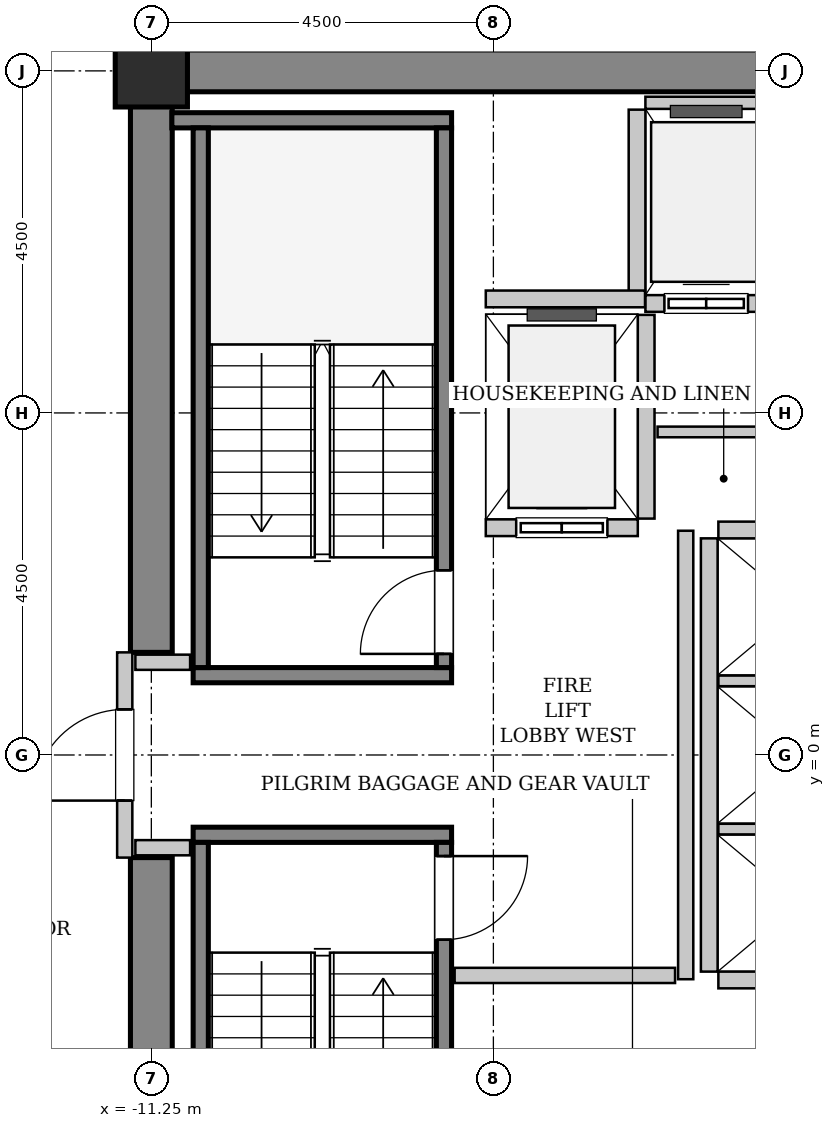
"""IFC4 building model, lengths in metres.
Left out: names, types, materials, properties, quantities, classifications, styles, units other than length and angle.
Written with IfcOpenShell. Run it as: python <this file> out.ifc"""

import sys

from ifc_helpers import new_model, si_unit, direction, frame, frame_2d, origin, origin_2d, place, context, subcontext, project, spatial, rectangle, hollow_rectangle, extrude, source, transform, mapped, element, fill, save


model = new_model("IFC4")
c1 = context("Model", 3, precision=1e-05, world=origin(), true_north=direction((0.0, 1.0)))
c2 = subcontext(c1, "Body", "Model", "MODEL_VIEW")
j1 = project(units=[si_unit("LENGTHUNIT", "METRE"), si_unit("PLANEANGLEUNIT", "RADIAN")], contexts=[c1])
p1 = place(None, origin())
s1 = spatial("IfcSite", under=j1, at=p1, CompositionType="ELEMENT")
p2 = place(p1, origin())
s2 = spatial("IfcBuilding", under=s1, at=p2, CompositionType="ELEMENT")
p3 = place(p2, frame((0.0, 0.0, 113.6)))
s3 = spatial("IfcBuildingStorey", under=s2, at=p3, CompositionType="ELEMENT", Elevation=113.6)
m1 = source(origin(), c2, "Body", "SweptSolid", [
    extrude(rectangle(XDim=9.975, YDim=0.55, at=frame_2d((4.987, 0.0))), origin(), (0.0, 0.0, 1.0), 3.8),
])
p4 = place(p3, frame((-11.525, 9.0, 0.0), z_axis=(0.0, 0.0, 1.0), x_axis=(1.0, 0.0, 0.0)))
e1 = element("IfcWall", 1, at=p4, inside=s3, PredefinedType="SHEAR", context=c2, shape_type="MappedRepresentation", body=[
    mapped(m1, transform((0.0, 0.0, 0.0), x_axis=(1.0, 0.0, 0.0), y_axis=(0.0, 1.0, 0.0), z_axis=(0.0, 0.0, 1.0), scale=1.0)),
])
m2 = source(origin(), c2, "Body", "SweptSolid", [
    extrude(rectangle(XDim=7.375, YDim=0.55, at=frame_2d((3.688, 0.0))), origin(), (0.0, 0.0, 1.0), 3.8),
])
for number, where, z_axis, x_axis in (
    (2, (-11.25, -8.725, 0.0), (0.0, 0.0, 1.0), (0.0, 1.0, 0.0)),
    (3, (-11.25, 1.35, 0.0), (0.0, 0.0, 1.0), (0.0, 1.0, 0.0)),
):
    element("IfcWall", number, at=place(p3, frame(where, z_axis=z_axis, x_axis=x_axis)), inside=s3, PredefinedType="SHEAR", context=c2, shape_type="MappedRepresentation", body=[
        mapped(m2, transform((0.0, 0.0, 0.0), x_axis=(1.0, 0.0, 0.0), y_axis=(0.0, 1.0, 0.0), z_axis=(0.0, 0.0, 1.0), scale=1.0)),
    ])
m3 = source(origin(), c2, "Body", "SweptSolid", [
    extrude(hollow_rectangle(XDim=0.95, YDim=0.95, WallThickness=0.045, InnerFilletRadius=0.045, OuterFilletRadius=0.09, at=origin_2d()), origin(), (0.0, 0.0, 1.0), 3.8),
])
p5 = place(p3, frame((-11.25, 9.0, 0.0), z_axis=(0.0, 0.0, 1.0), x_axis=(1.0, 0.0, 0.0)))
e4 = element("IfcColumn", 4, at=p5, inside=s3, PredefinedType="COLUMN", context=c2, shape_type="MappedRepresentation", body=[
    mapped(m3, transform((0.0, 0.0, 0.0), x_axis=(1.0, 0.0, 0.0), y_axis=(0.0, 1.0, 0.0), z_axis=(0.0, 0.0, 1.0), scale=1.0)),
])
m4 = source(origin(), c2, "Body", "SweptSolid", [
    extrude(rectangle(XDim=3.4, YDim=0.2, at=frame_2d((1.7, 0.0))), origin(), (0.0, 0.0, 1.0), 3.8),
])
p6 = place(p3, frame((-7.3, 1.05, 0.0), z_axis=(0.0, 0.0, 1.0), x_axis=(-1.0, 0.0, 0.0)))
e5 = element("IfcWall", 5, at=p6, inside=s3, PredefinedType="SOLIDWALL", context=c2, shape_type="MappedRepresentation", body=[
    mapped(m4, transform((0.0, 0.0, 0.0), x_axis=(1.0, 0.0, 0.0), y_axis=(0.0, 1.0, 0.0), z_axis=(0.0, 0.0, 1.0), scale=1.0)),
])
m5 = source(origin(), c2, "Body", "SweptSolid", [
    extrude(rectangle(XDim=3.68, YDim=0.2, at=frame_2d((1.84, 0.0))), origin(), (0.0, 0.0, 1.0), 3.8),
])
p7 = place(p3, frame((-7.3, 8.35, 0.0), z_axis=(0.0, 0.0, 1.0), x_axis=(-1.0, 0.0, 0.0)))
e6 = element("IfcWall", 6, at=p7, inside=s3, PredefinedType="SOLIDWALL", context=c2, shape_type="MappedRepresentation", body=[
    mapped(m5, transform((0.0, 0.0, 0.0), x_axis=(1.0, 0.0, 0.0), y_axis=(0.0, 1.0, 0.0), z_axis=(0.0, 0.0, 1.0), scale=1.0)),
])
m6 = source(origin(), c2, "Body", "SweptSolid", [
    extrude(rectangle(XDim=7.1, YDim=0.2, at=frame_2d((3.55, 0.0))), origin(), (0.0, 0.0, 1.0), 3.8),
])
p8 = place(p3, frame((-7.4, 1.15, 0.0), z_axis=(0.0, 0.0, 1.0), x_axis=(0.0, 1.0, 0.0)))
e7 = element("IfcWall", 7, at=p8, inside=s3, PredefinedType="SOLIDWALL", context=c2, shape_type="MappedRepresentation", body=[
    mapped(m6, transform((0.0, 0.0, 0.0), x_axis=(1.0, 0.0, 0.0), y_axis=(0.0, 1.0, 0.0), z_axis=(0.0, 0.0, 1.0), scale=1.0)),
])
p9 = place(p8, frame((0.18, 0.0, 0.0)))
e8 = element("IfcOpeningElement", 8, at=p9, cuts=e7, PredefinedType="OPENING", context=c2, shape_type="SweptSolid", body=[
    extrude(rectangle(XDim=1.1, YDim=2.15, at=frame_2d((0.55, 1.075))), frame((0.0, 0.11, 0.0), z_axis=(0.0, -1.0, 0.0), x_axis=(1.0, 0.0, 0.0)), (0.0, 0.0, 1.0), 0.22),
])
p10 = place(p3, frame((-10.6, 1.15, 0.0), z_axis=(0.0, 0.0, 1.0), x_axis=(0.0, 1.0, 0.0)))
e9 = element("IfcWall", 9, at=p10, inside=s3, PredefinedType="SOLIDWALL", context=c2, shape_type="MappedRepresentation", body=[
    mapped(m6, transform((0.0, 0.0, 0.0), x_axis=(1.0, 0.0, 0.0), y_axis=(0.0, 1.0, 0.0), z_axis=(0.0, 0.0, 1.0), scale=1.0)),
])
p11 = place(p3, frame((-10.7, -1.05, 0.0), z_axis=(0.0, 0.0, 1.0), x_axis=(1.0, 0.0, 0.0)))
e10 = element("IfcWall", 10, at=p11, inside=s3, PredefinedType="SOLIDWALL", context=c2, shape_type="MappedRepresentation", body=[
    mapped(m4, transform((0.0, 0.0, 0.0), x_axis=(1.0, 0.0, 0.0), y_axis=(0.0, 1.0, 0.0), z_axis=(0.0, 0.0, 1.0), scale=1.0)),
])
p12 = place(p3, frame((-10.6, -1.15, 0.0), z_axis=(0.0, 0.0, 1.0), x_axis=(0.0, -1.0, 0.0)))
e11 = element("IfcWall", 11, at=p12, inside=s3, PredefinedType="SOLIDWALL", context=c2, shape_type="MappedRepresentation", body=[
    mapped(m6, transform((0.0, 0.0, 0.0), x_axis=(1.0, 0.0, 0.0), y_axis=(0.0, 1.0, 0.0), z_axis=(0.0, 0.0, 1.0), scale=1.0)),
])
p13 = place(p3, frame((-7.4, -1.15, 0.0), z_axis=(0.0, 0.0, 1.0), x_axis=(0.0, -1.0, 0.0)))
e12 = element("IfcWall", 12, at=p13, inside=s3, PredefinedType="SOLIDWALL", context=c2, shape_type="MappedRepresentation", body=[
    mapped(m6, transform((0.0, 0.0, 0.0), x_axis=(1.0, 0.0, 0.0), y_axis=(0.0, 1.0, 0.0), z_axis=(0.0, 0.0, 1.0), scale=1.0)),
])
p14 = place(p13, frame((0.18, 0.0, 0.0)))
e13 = element("IfcOpeningElement", 13, at=p14, cuts=e12, PredefinedType="OPENING", context=c2, shape_type="SweptSolid", body=[
    extrude(rectangle(XDim=1.1, YDim=2.15, at=frame_2d((0.55, 1.075))), frame((0.0, 0.11, 0.0), z_axis=(0.0, -1.0, 0.0), x_axis=(1.0, 0.0, 0.0)), (0.0, 0.0, 1.0), 0.22),
])
m7 = source(origin(), c2, "Body", "SweptSolid", [
    extrude(rectangle(XDim=2.0, YDim=0.22, at=frame_2d((1.0, 0.0))), origin(), (0.0, 0.0, 1.0), 3.535),
])
p15 = place(p3, frame((-6.85, 2.99, 0.0), z_axis=(0.0, 0.0, 1.0), x_axis=(1.0, 0.0, 0.0)))
e14 = element("IfcWall", 14, at=p15, inside=s3, PredefinedType="SOLIDWALL", context=c2, shape_type="MappedRepresentation", body=[
    mapped(m7, transform((0.0, 0.0, 0.0), x_axis=(1.0, 0.0, 0.0), y_axis=(0.0, 1.0, 0.0), z_axis=(0.0, 0.0, 1.0), scale=1.0)),
])
p16 = place(p15, frame((0.4, 0.0, 0.0)))
e15 = element("IfcOpeningElement", 15, at=p16, cuts=e14, PredefinedType="OPENING", context=c2, shape_type="SweptSolid", body=[
    extrude(rectangle(XDim=1.2, YDim=2.2, at=frame_2d((0.6, 1.1))), frame((0.0, 0.12, 0.0), z_axis=(0.0, -1.0, 0.0), x_axis=(1.0, 0.0, 0.0)), (0.0, 0.0, 1.0), 0.24),
])
m8 = source(origin(), c2, "Body", "SweptSolid", [
    extrude(rectangle(XDim=2.68, YDim=0.22, at=frame_2d((1.34, 0.0))), origin(), (0.0, 0.0, 1.0), 3.535),
])
p17 = place(p3, frame((-4.74, 3.11, 0.0), z_axis=(0.0, 0.0, 1.0), x_axis=(0.0, 1.0, 0.0)))
e16 = element("IfcWall", 16, at=p17, inside=s3, PredefinedType="SOLIDWALL", context=c2, shape_type="MappedRepresentation", body=[
    mapped(m8, transform((0.0, 0.0, 0.0), x_axis=(1.0, 0.0, 0.0), y_axis=(0.0, 1.0, 0.0), z_axis=(0.0, 0.0, 1.0), scale=1.0)),
])
m9 = source(origin(), c2, "Body", "SweptSolid", [
    extrude(rectangle(XDim=3.2, YDim=0.22, at=frame_2d((1.6, 0.0))), origin(), (0.0, 0.0, 1.0), 3.535),
])
p18 = place(p3, frame((-4.75, 5.94, 0.0), z_axis=(0.0, 0.0, 1.0), x_axis=(1.0, 0.0, 0.0)))
e17 = element("IfcWall", 17, at=p18, inside=s3, PredefinedType="SOLIDWALL", context=c2, shape_type="MappedRepresentation", body=[
    mapped(m9, transform((0.0, 0.0, 0.0), x_axis=(1.0, 0.0, 0.0), y_axis=(0.0, 1.0, 0.0), z_axis=(0.0, 0.0, 1.0), scale=1.0)),
])
p19 = place(p18, frame((0.25, 0.0, 0.0)))
e18 = element("IfcOpeningElement", 18, at=p19, cuts=e17, PredefinedType="OPENING", context=c2, shape_type="SweptSolid", body=[
    extrude(rectangle(XDim=1.1, YDim=2.2, at=frame_2d((0.55, 1.1))), frame((0.0, 0.12, 0.0), z_axis=(0.0, -1.0, 0.0), x_axis=(1.0, 0.0, 0.0)), (0.0, 0.0, 1.0), 0.24),
])
p20 = place(p18, frame((1.875, 0.0, 0.0)))
e19 = element("IfcOpeningElement", 19, at=p20, cuts=e17, PredefinedType="OPENING", context=c2, shape_type="SweptSolid", body=[
    extrude(rectangle(XDim=1.1, YDim=2.2, at=frame_2d((0.55, 1.1))), frame((0.0, 0.12, 0.0), z_axis=(0.0, -1.0, 0.0), x_axis=(1.0, 0.0, 0.0)), (0.0, 0.0, 1.0), 0.24),
])
m10 = source(origin(), c2, "Body", "SweptSolid", [
    extrude(rectangle(XDim=3.2, YDim=0.16, at=frame_2d((1.6, 0.0))), origin(), (0.0, 0.0, 1.0), 2.425),
])
p21 = place(p3, frame((-1.55, 8.58, 0.0), z_axis=(0.0, 0.0, 1.0), x_axis=(-1.0, 0.0, 0.0)))
e20 = element("IfcWall", 20, at=p21, inside=s3, PredefinedType="PARTITIONING", context=c2, shape_type="MappedRepresentation", body=[
    mapped(m10, transform((0.0, 0.0, 0.0), x_axis=(1.0, 0.0, 0.0), y_axis=(0.0, 1.0, 0.0), z_axis=(0.0, 0.0, 1.0), scale=1.0)),
])
m11 = source(origin(), c2, "Body", "SweptSolid", [
    extrude(rectangle(XDim=2.43, YDim=0.22, at=frame_2d((1.215, 0.0))), origin(), (0.0, 0.0, 1.0), 3.535),
])
p22 = place(p3, frame((-4.86, 8.49, 0.0), z_axis=(0.0, 0.0, 1.0), x_axis=(0.0, -1.0, 0.0)))
e21 = element("IfcWall", 21, at=p22, inside=s3, PredefinedType="SOLIDWALL", context=c2, shape_type="MappedRepresentation", body=[
    mapped(m11, transform((0.0, 0.0, 0.0), x_axis=(1.0, 0.0, 0.0), y_axis=(0.0, 1.0, 0.0), z_axis=(0.0, 0.0, 1.0), scale=1.0)),
])
m12 = source(origin(), c2, "Body", "SweptSolid", [
    extrude(rectangle(XDim=5.7, YDim=0.22, at=frame_2d((2.85, 0.0))), origin(), (0.0, 0.0, 1.0), 3.535),
])
p23 = place(p3, frame((-3.91, 2.85, 0.0), z_axis=(0.0, 0.0, 1.0), x_axis=(0.0, -1.0, 0.0)))
e22 = element("IfcWall", 22, at=p23, inside=s3, PredefinedType="SOLIDWALL", context=c2, shape_type="MappedRepresentation", body=[
    mapped(m12, transform((0.0, 0.0, 0.0), x_axis=(1.0, 0.0, 0.0), y_axis=(0.0, 1.0, 0.0), z_axis=(0.0, 0.0, 1.0), scale=1.0)),
])
m13 = source(origin(), c2, "Body", "SweptSolid", [
    extrude(rectangle(XDim=2.13, YDim=0.22, at=frame_2d((1.065, 0.0))), origin(), (0.0, 0.0, 1.0), 3.535),
])
p24 = place(p3, frame((-3.79, -2.96, 0.0), z_axis=(0.0, 0.0, 1.0), x_axis=(1.0, 0.0, 0.0)))
e23 = element("IfcWall", 23, at=p24, inside=s3, PredefinedType="SOLIDWALL", context=c2, shape_type="MappedRepresentation", body=[
    mapped(m13, transform((0.0, 0.0, 0.0), x_axis=(1.0, 0.0, 0.0), y_axis=(0.0, 1.0, 0.0), z_axis=(0.0, 0.0, 1.0), scale=1.0)),
])
m14 = source(origin(), c2, "Body", "SweptSolid", [
    extrude(rectangle(XDim=2.13, YDim=0.14, at=frame_2d((1.065, 0.0))), origin(), (0.0, 0.0, 1.0), 3.535),
])
for number, where, z_axis, x_axis in (
    (24, (-3.79, -0.975, 0.0), (0.0, 0.0, 1.0), (1.0, 0.0, 0.0)),
    (25, (-3.79, 0.975, 0.0), (0.0, 0.0, 1.0), (1.0, 0.0, 0.0)),
):
    element("IfcWall", number, at=place(p3, frame(where, z_axis=z_axis, x_axis=x_axis)), inside=s3, PredefinedType="PARTITIONING", context=c2, shape_type="MappedRepresentation", body=[
        mapped(m14, transform((0.0, 0.0, 0.0), x_axis=(1.0, 0.0, 0.0), y_axis=(0.0, 1.0, 0.0), z_axis=(0.0, 0.0, 1.0), scale=1.0)),
    ])
p25 = place(p3, frame((-1.66, 2.96, 0.0), z_axis=(0.0, 0.0, 1.0), x_axis=(-1.0, 0.0, 0.0)))
e26 = element("IfcWall", 26, at=p25, inside=s3, PredefinedType="SOLIDWALL", context=c2, shape_type="MappedRepresentation", body=[
    mapped(m13, transform((0.0, 0.0, 0.0), x_axis=(1.0, 0.0, 0.0), y_axis=(0.0, 1.0, 0.0), z_axis=(0.0, 0.0, 1.0), scale=1.0)),
])
m15 = source(origin(), c2, "Body", "SweptSolid", [
    extrude(rectangle(XDim=2.095, YDim=0.22, at=frame_2d((1.048, 0.0))), origin(), (0.0, 0.0, 1.0), 3.535),
])
p26 = place(p3, frame((-6.85, 6.0, 0.0), z_axis=(0.0, 0.0, 1.0), x_axis=(1.0, 0.0, 0.0)))
e27 = element("IfcWall", 27, at=p26, inside=s3, PredefinedType="SOLIDWALL", context=c2, shape_type="MappedRepresentation", body=[
    mapped(m15, transform((0.0, 0.0, 0.0), x_axis=(1.0, 0.0, 0.0), y_axis=(0.0, 1.0, 0.0), z_axis=(0.0, 0.0, 1.0), scale=1.0)),
])
m16 = source(origin(), c2, "Body", "SweptSolid", [
    extrude(rectangle(XDim=2.7, YDim=0.2, at=frame_2d((1.35, 0.0))), origin(), (0.0, 0.0, 1.0), 2.425),
])
p27 = place(p3, frame((-11.6, -1.35, 0.0), z_axis=(0.0, 0.0, 1.0), x_axis=(0.0, 1.0, 0.0)))
e28 = element("IfcWall", 28, at=p27, inside=s3, PredefinedType="PARTITIONING", context=c2, shape_type="MappedRepresentation", body=[
    mapped(m16, transform((0.0, 0.0, 0.0), x_axis=(1.0, 0.0, 0.0), y_axis=(0.0, 1.0, 0.0), z_axis=(0.0, 0.0, 1.0), scale=1.0)),
])
p28 = place(p27, frame((0.75, 0.0, 0.0)))
e29 = element("IfcOpeningElement", 29, at=p28, cuts=e28, PredefinedType="OPENING", context=c2, shape_type="SweptSolid", body=[
    extrude(rectangle(XDim=1.2, YDim=2.15, at=frame_2d((0.6, 1.075))), frame((0.0, 0.11, 0.0), z_axis=(0.0, -1.0, 0.0), x_axis=(1.0, 0.0, 0.0)), (0.0, 0.0, 1.0), 0.22),
])
m17 = source(origin(), c2, "Body", "SweptSolid", [
    extrude(rectangle(XDim=5.9, YDim=0.2, at=frame_2d((2.95, 0.0))), origin(), (0.0, 0.0, 1.0), 3.535),
])
p29 = place(p3, frame((-4.22, -2.95, 0.0), z_axis=(0.0, 0.0, 1.0), x_axis=(0.0, 1.0, 0.0)))
e30 = element("IfcWall", 30, at=p29, inside=s3, PredefinedType="PARTITIONING", context=c2, shape_type="MappedRepresentation", body=[
    mapped(m17, transform((0.0, 0.0, 0.0), x_axis=(1.0, 0.0, 0.0), y_axis=(0.0, 1.0, 0.0), z_axis=(0.0, 0.0, 1.0), scale=1.0)),
])
m18 = source(origin(), c2, "Body", "SweptSolid", [
    extrude(rectangle(XDim=2.9, YDim=0.2, at=frame_2d((1.45, 0.0))), origin(), (0.0, 0.0, 1.0), 3.535),
])
p30 = place(p3, frame((-7.26, -2.9, 0.0), z_axis=(0.0, 0.0, 1.0), x_axis=(1.0, 0.0, 0.0)))
e31 = element("IfcWall", 31, at=p30, inside=s3, PredefinedType="PARTITIONING", context=c2, shape_type="MappedRepresentation", body=[
    mapped(m18, transform((0.0, 0.0, 0.0), x_axis=(1.0, 0.0, 0.0), y_axis=(0.0, 1.0, 0.0), z_axis=(0.0, 0.0, 1.0), scale=1.0)),
])
m19 = source(origin(), c2, "Body", "SweptSolid", [
    extrude(rectangle(XDim=0.72, YDim=0.2, at=frame_2d((0.36, 0.0))), origin(), (0.0, 0.0, 1.0), 3.535),
])
for number, where, z_axis, x_axis in (
    (32, (-11.46, 1.22, 0.0), (0.0, 0.0, 1.0), (1.0, 0.0, 0.0)),
    (33, (-11.46, -1.22, 0.0), (0.0, 0.0, 1.0), (1.0, 0.0, 0.0)),
):
    element("IfcWall", number, at=place(p3, frame(where, z_axis=z_axis, x_axis=x_axis)), inside=s3, PredefinedType="PARTITIONING", context=c2, shape_type="MappedRepresentation", body=[
        mapped(m19, transform((0.0, 0.0, 0.0), x_axis=(1.0, 0.0, 0.0), y_axis=(0.0, 1.0, 0.0), z_axis=(0.0, 0.0, 1.0), scale=1.0)),
    ])
m20 = source(origin(), c2, "Body", "SweptSolid", [
    extrude(rectangle(XDim=2.95, YDim=0.14, at=frame_2d((1.475, 0.0))), origin(), (0.0, 0.0, 1.0), 3.535),
])
p31 = place(p3, frame((-4.59, 4.25, 0.0), z_axis=(0.0, 0.0, 1.0), x_axis=(1.0, 0.0, 0.0)))
e34 = element("IfcWall", 34, at=p31, inside=s3, PredefinedType="PARTITIONING", context=c2, shape_type="MappedRepresentation", body=[
    mapped(m20, transform((0.0, 0.0, 0.0), x_axis=(1.0, 0.0, 0.0), y_axis=(0.0, 1.0, 0.0), z_axis=(0.0, 0.0, 1.0), scale=1.0)),
])
m21 = source(origin(), c2, "Body", "SweptSolid", [
    extrude(rectangle(XDim=1.1, YDim=2.15, at=frame_2d((0.55, 1.075))), frame((0.0, 0.025, 0.0), z_axis=(0.0, -1.0, 0.0), x_axis=(1.0, 0.0, 0.0)), (0.0, 0.0, 1.0), 0.05),
])
p32 = place(p9, origin())
e35 = element("IfcDoor", 35, at=p32, inside=s3, OperationType="SINGLE_SWING_LEFT", PredefinedType="DOOR", context=c2, shape_type="MappedRepresentation", body=[
    mapped(m21, transform((0.0, 0.0, 0.0), x_axis=(1.0, 0.0, 0.0), y_axis=(0.0, 1.0, 0.0), z_axis=(0.0, 0.0, 1.0), scale=1.0)),
])
fill(e8, e35)
p33 = place(p14, origin())
e36 = element("IfcDoor", 36, at=p33, inside=s3, OperationType="SINGLE_SWING_LEFT", PredefinedType="DOOR", context=c2, shape_type="MappedRepresentation", body=[
    mapped(m21, transform((0.0, 0.0, 0.0), x_axis=(1.0, 0.0, 0.0), y_axis=(0.0, 1.0, 0.0), z_axis=(0.0, 0.0, 1.0), scale=1.0)),
])
fill(e13, e36)
m22 = source(origin(), c2, "Body", "SweptSolid", [
    extrude(rectangle(XDim=1.2, YDim=2.2, at=frame_2d((0.6, 1.1))), frame((0.0, 0.025, 0.0), z_axis=(0.0, -1.0, 0.0), x_axis=(1.0, 0.0, 0.0)), (0.0, 0.0, 1.0), 0.05),
])
p34 = place(p16, origin())
e37 = element("IfcDoor", 37, at=p34, inside=s3, OperationType="SLIDING_TO_LEFT", PredefinedType="DOOR", context=c2, shape_type="MappedRepresentation", body=[
    mapped(m22, transform((0.0, 0.0, 0.0), x_axis=(1.0, 0.0, 0.0), y_axis=(0.0, 1.0, 0.0), z_axis=(0.0, 0.0, 1.0), scale=1.0)),
])
fill(e15, e37)
m23 = source(origin(), c2, "Body", "SweptSolid", [
    extrude(rectangle(XDim=1.1, YDim=2.2, at=frame_2d((0.55, 1.1))), frame((0.0, 0.025, 0.0), z_axis=(0.0, -1.0, 0.0), x_axis=(1.0, 0.0, 0.0)), (0.0, 0.0, 1.0), 0.05),
])
p35 = place(p19, origin())
e38 = element("IfcDoor", 38, at=p35, inside=s3, OperationType="DOUBLE_DOOR_SLIDING", PredefinedType="DOOR", context=c2, shape_type="MappedRepresentation", body=[
    mapped(m23, transform((0.0, 0.0, 0.0), x_axis=(1.0, 0.0, 0.0), y_axis=(0.0, 1.0, 0.0), z_axis=(0.0, 0.0, 1.0), scale=1.0)),
])
fill(e18, e38)
m24 = source(origin(), c2, "Body", "SweptSolid", [
    extrude(rectangle(XDim=1.2, YDim=2.15, at=frame_2d((0.6, 1.075))), frame((0.0, 0.025, 0.0), z_axis=(0.0, -1.0, 0.0), x_axis=(1.0, 0.0, 0.0)), (0.0, 0.0, 1.0), 0.05),
])
p36 = place(p28, origin())
e39 = element("IfcDoor", 39, at=p36, inside=s3, OperationType="SINGLE_SWING_LEFT", PredefinedType="DOOR", context=c2, shape_type="MappedRepresentation", body=[
    mapped(m24, transform((0.0, 0.0, 0.0), x_axis=(1.0, 0.0, 0.0), y_axis=(0.0, 1.0, 0.0), z_axis=(0.0, 0.0, 1.0), scale=1.0)),
])
fill(e29, e39)
save(model, sys.argv[1])
